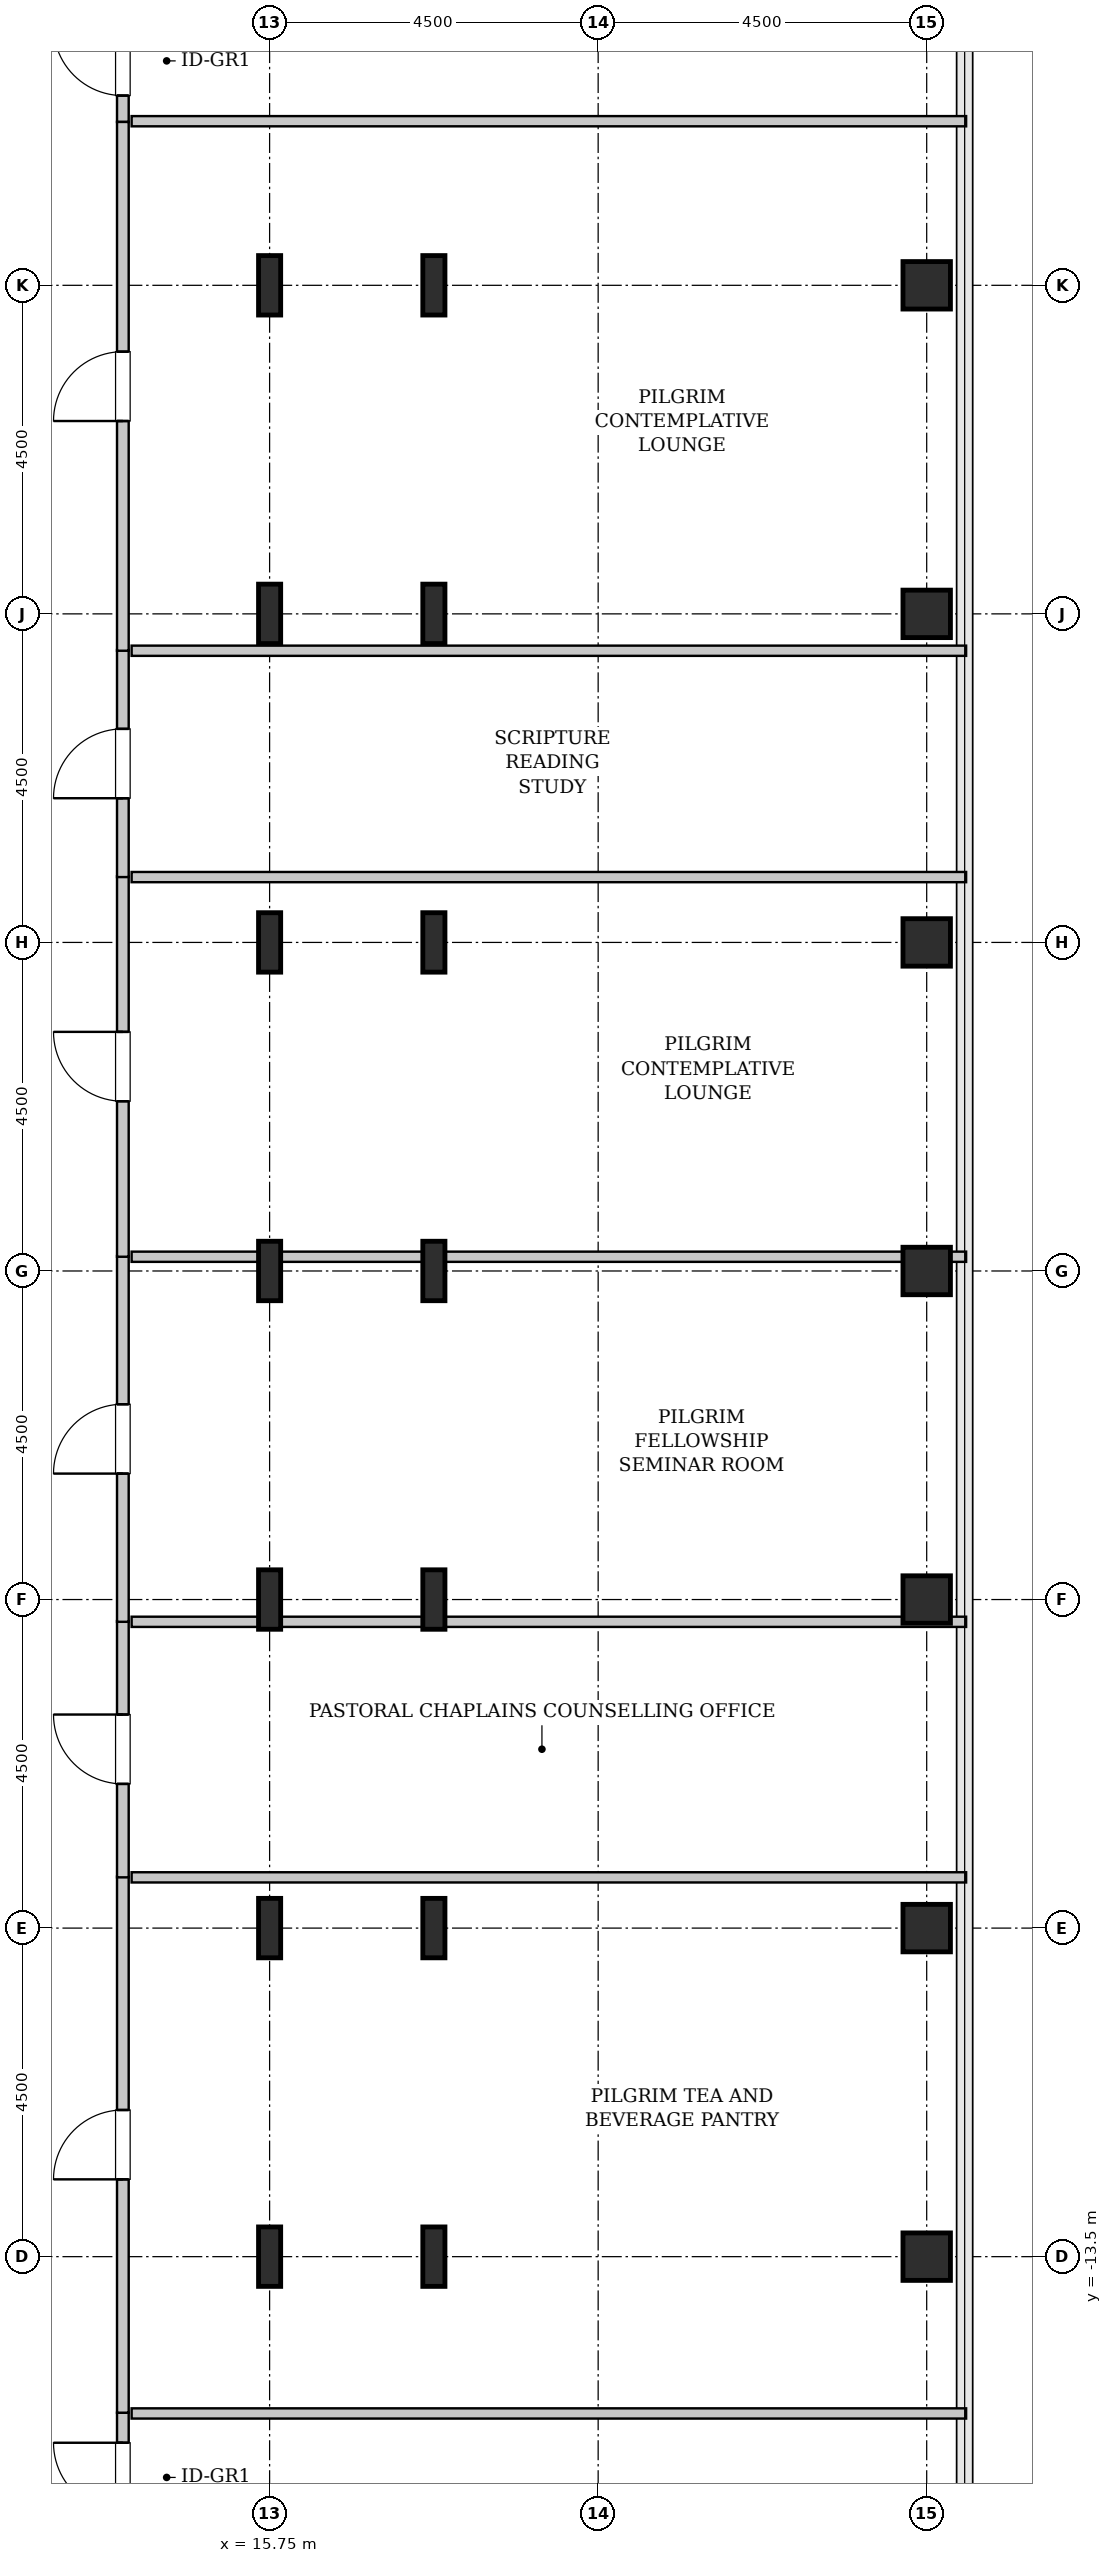
"""IFC4 building model, lengths in metres.
Left out: names, types, materials, properties, quantities, classifications, styles, units other than length and angle.
Written with IfcOpenShell. Run it as: python <this file> out.ifc"""

import sys

from ifc_helpers import new_model, si_unit, direction, frame, frame_2d, origin, origin_2d, place, context, subcontext, project, spatial, rectangle, hollow_rectangle, i_section, extrude, source, transform, mapped, element, fill, save


model = new_model("IFC4")
c1 = context("Model", 3, precision=1e-05, world=origin(), true_north=direction((0.0, 1.0)))
c2 = subcontext(c1, "Body", "Model", "MODEL_VIEW")
j1 = project(units=[si_unit("LENGTHUNIT", "METRE"), si_unit("PLANEANGLEUNIT", "RADIAN")], contexts=[c1])
p1 = place(None, origin())
s1 = spatial("IfcSite", under=j1, at=p1, CompositionType="ELEMENT")
p2 = place(p1, origin())
s2 = spatial("IfcBuilding", under=s1, at=p2, CompositionType="ELEMENT")
p3 = place(p2, frame((0.0, 0.0, 244.6)))
s3 = spatial("IfcBuildingStorey", under=s2, at=p3, CompositionType="ELEMENT", Elevation=244.6)
m1 = source(origin(), c2, "Body", "SweptSolid", [
    extrude(i_section(OverallWidth=0.303, OverallDepth=0.814, WebThickness=0.021, FlangeThickness=0.04, FilletRadius=0.03, at=origin_2d()), origin(), (0.0, 0.0, 1.0), 3.8),
])
for number, where, z_axis, x_axis in (
    (1, (15.75, -13.5, 0.0), (0.0, 0.0, 1.0), (1.0, 0.0, 0.0)),
    (2, (15.75, -9.0, 0.0), (0.0, 0.0, 1.0), (1.0, 0.0, 0.0)),
    (3, (15.75, -4.5, 0.0), (0.0, 0.0, 1.0), (1.0, 0.0, 0.0)),
    (4, (15.75, 0.0, 0.0), (0.0, 0.0, 1.0), (1.0, 0.0, 0.0)),
    (5, (15.75, 4.5, 0.0), (0.0, 0.0, 1.0), (1.0, 0.0, 0.0)),
    (6, (15.75, 9.0, 0.0), (0.0, 0.0, 1.0), (1.0, 0.0, 0.0)),
    (7, (15.75, 13.5, 0.0), (0.0, 0.0, 1.0), (1.0, 0.0, 0.0)),
    (8, (18.0, -13.5, 0.0), (0.0, 0.0, 1.0), (1.0, 0.0, 0.0)),
    (9, (18.0, -9.0, 0.0), (0.0, 0.0, 1.0), (1.0, 0.0, 0.0)),
    (10, (18.0, -4.5, 0.0), (0.0, 0.0, 1.0), (1.0, 0.0, 0.0)),
    (11, (18.0, 0.0, 0.0), (0.0, 0.0, 1.0), (1.0, 0.0, 0.0)),
    (12, (18.0, 4.5, 0.0), (0.0, 0.0, 1.0), (1.0, 0.0, 0.0)),
    (13, (18.0, 9.0, 0.0), (0.0, 0.0, 1.0), (1.0, 0.0, 0.0)),
    (14, (18.0, 13.5, 0.0), (0.0, 0.0, 1.0), (1.0, 0.0, 0.0)),
):
    element("IfcColumn", number, at=place(p3, frame(where, z_axis=z_axis, x_axis=x_axis)), inside=s3, PredefinedType="COLUMN", context=c2, shape_type="MappedRepresentation", body=[
        mapped(m1, transform((0.0, 0.0, 0.0), x_axis=(1.0, 0.0, 0.0), y_axis=(0.0, 1.0, 0.0), z_axis=(0.0, 0.0, 1.0), scale=1.0)),
    ])
m2 = source(origin(), c2, "Body", "SweptSolid", [
    extrude(hollow_rectangle(XDim=0.65, YDim=0.65, WallThickness=0.032, InnerFilletRadius=0.032, OuterFilletRadius=0.064, at=origin_2d()), origin(), (0.0, 0.0, 1.0), 3.8),
])
for number, where, z_axis, x_axis in (
    (15, (24.75, -13.5, 0.0), (0.0, 0.0, 1.0), (1.0, 0.0, 0.0)),
    (16, (24.75, -9.0, 0.0), (0.0, 0.0, 1.0), (1.0, 0.0, 0.0)),
    (17, (24.75, -4.5, 0.0), (0.0, 0.0, 1.0), (1.0, 0.0, 0.0)),
    (18, (24.75, 0.0, 0.0), (0.0, 0.0, 1.0), (1.0, 0.0, 0.0)),
    (19, (24.75, 4.5, 0.0), (0.0, 0.0, 1.0), (1.0, 0.0, 0.0)),
    (20, (24.75, 9.0, 0.0), (0.0, 0.0, 1.0), (1.0, 0.0, 0.0)),
    (21, (24.75, 13.5, 0.0), (0.0, 0.0, 1.0), (1.0, 0.0, 0.0)),
):
    element("IfcColumn", number, at=place(p3, frame(where, z_axis=z_axis, x_axis=x_axis)), inside=s3, PredefinedType="COLUMN", context=c2, shape_type="MappedRepresentation", body=[
        mapped(m2, transform((0.0, 0.0, 0.0), x_axis=(1.0, 0.0, 0.0), y_axis=(0.0, 1.0, 0.0), z_axis=(0.0, 0.0, 1.0), scale=1.0)),
    ])
m3 = source(origin(), c2, "Body", "SweptSolid", [
    extrude(rectangle(XDim=7.403, YDim=0.16, at=frame_2d((3.701, 0.0))), origin(), (0.0, 0.0, 1.0), 3.535),
])
p4 = place(p3, frame((13.74, -23.04, 0.0), z_axis=(0.0, 0.0, 1.0), x_axis=(0.0, 1.0, 0.0)))
e22 = element("IfcWall", 22, at=p4, inside=s3, PredefinedType="PARTITIONING", context=c2, shape_type="MappedRepresentation", body=[
    mapped(m3, transform((0.0, 0.0, 0.0), x_axis=(1.0, 0.0, 0.0), y_axis=(0.0, 1.0, 0.0), z_axis=(0.0, 0.0, 1.0), scale=1.0)),
])
p5 = place(p4, frame((6.041, 0.0, 0.0)))
e23 = element("IfcOpeningElement", 23, at=p5, cuts=e22, PredefinedType="OPENING", context=c2, shape_type="SweptSolid", body=[
    extrude(rectangle(XDim=0.95, YDim=2.1, at=frame_2d((0.475, 1.05))), frame((0.0, 0.09, 0.0), z_axis=(0.0, -1.0, 0.0), x_axis=(1.0, 0.0, 0.0)), (0.0, 0.0, 1.0), 0.18),
])
m4 = source(origin(), c2, "Body", "SweptSolid", [
    extrude(rectangle(XDim=11.43, YDim=0.14, at=frame_2d((5.715, 0.0))), origin(), (0.0, 0.0, 1.0), 3.535),
])
p6 = place(p3, frame((13.86, -15.647, 0.0), z_axis=(0.0, 0.0, 1.0), x_axis=(1.0, 0.0, 0.0)))
e24 = element("IfcWall", 24, at=p6, inside=s3, PredefinedType="PARTITIONING", context=c2, shape_type="MappedRepresentation", body=[
    mapped(m4, transform((0.0, 0.0, 0.0), x_axis=(1.0, 0.0, 0.0), y_axis=(0.0, 1.0, 0.0), z_axis=(0.0, 0.0, 1.0), scale=1.0)),
])
m5 = source(origin(), c2, "Body", "SweptSolid", [
    extrude(rectangle(XDim=7.343, YDim=0.16, at=frame_2d((3.671, 0.0))), origin(), (0.0, 0.0, 1.0), 3.535),
])
p7 = place(p3, frame((13.74, -15.637, 0.0), z_axis=(0.0, 0.0, 1.0), x_axis=(0.0, 1.0, 0.0)))
e25 = element("IfcWall", 25, at=p7, inside=s3, PredefinedType="PARTITIONING", context=c2, shape_type="MappedRepresentation", body=[
    mapped(m5, transform((0.0, 0.0, 0.0), x_axis=(1.0, 0.0, 0.0), y_axis=(0.0, 1.0, 0.0), z_axis=(0.0, 0.0, 1.0), scale=1.0)),
])
p8 = place(p7, frame((3.196, 0.0, 0.0)))
e26 = element("IfcOpeningElement", 26, at=p8, cuts=e25, PredefinedType="OPENING", context=c2, shape_type="SweptSolid", body=[
    extrude(rectangle(XDim=0.95, YDim=2.1, at=frame_2d((0.475, 1.05))), frame((0.0, 0.09, 0.0), z_axis=(0.0, -1.0, 0.0), x_axis=(1.0, 0.0, 0.0)), (0.0, 0.0, 1.0), 0.18),
])
p9 = place(p3, frame((13.86, -8.305, 0.0), z_axis=(0.0, 0.0, 1.0), x_axis=(1.0, 0.0, 0.0)))
e27 = element("IfcWall", 27, at=p9, inside=s3, PredefinedType="PARTITIONING", context=c2, shape_type="MappedRepresentation", body=[
    mapped(m4, transform((0.0, 0.0, 0.0), x_axis=(1.0, 0.0, 0.0), y_axis=(0.0, 1.0, 0.0), z_axis=(0.0, 0.0, 1.0), scale=1.0)),
])
m6 = source(origin(), c2, "Body", "SweptSolid", [
    extrude(rectangle(XDim=3.51, YDim=0.16, at=frame_2d((1.755, 0.0))), origin(), (0.0, 0.0, 1.0), 3.535),
])
p10 = place(p3, frame((13.74, -8.305, 0.0), z_axis=(0.0, 0.0, 1.0), x_axis=(0.0, 1.0, 0.0)))
e28 = element("IfcWall", 28, at=p10, inside=s3, PredefinedType="PARTITIONING", context=c2, shape_type="MappedRepresentation", body=[
    mapped(m6, transform((0.0, 0.0, 0.0), x_axis=(1.0, 0.0, 0.0), y_axis=(0.0, 1.0, 0.0), z_axis=(0.0, 0.0, 1.0), scale=1.0)),
])
p11 = place(p10, frame((1.28, 0.0, 0.0)))
e29 = element("IfcOpeningElement", 29, at=p11, cuts=e28, PredefinedType="OPENING", context=c2, shape_type="SweptSolid", body=[
    extrude(rectangle(XDim=0.95, YDim=2.1, at=frame_2d((0.475, 1.05))), frame((0.0, 0.09, 0.0), z_axis=(0.0, -1.0, 0.0), x_axis=(1.0, 0.0, 0.0)), (0.0, 0.0, 1.0), 0.18),
])
m7 = source(origin(), c2, "Body", "SweptSolid", [
    extrude(rectangle(XDim=11.43, YDim=0.14, at=frame_2d((5.715, 0.0))), origin(), (0.0, 0.0, 1.0), 2.925),
])
p12 = place(p3, frame((13.86, -4.805, 0.0), z_axis=(0.0, 0.0, 1.0), x_axis=(1.0, 0.0, 0.0)))
e30 = element("IfcWall", 30, at=p12, inside=s3, PredefinedType="PARTITIONING", context=c2, shape_type="MappedRepresentation", body=[
    mapped(m7, transform((0.0, 0.0, 0.0), x_axis=(1.0, 0.0, 0.0), y_axis=(0.0, 1.0, 0.0), z_axis=(0.0, 0.0, 1.0), scale=1.0)),
])
m8 = source(origin(), c2, "Body", "SweptSolid", [
    extrude(rectangle(XDim=5.01, YDim=0.16, at=frame_2d((2.505, 0.0))), origin(), (0.0, 0.0, 1.0), 3.535),
])
p13 = place(p3, frame((13.74, -4.805, 0.0), z_axis=(0.0, 0.0, 1.0), x_axis=(0.0, 1.0, 0.0)))
e31 = element("IfcWall", 31, at=p13, inside=s3, PredefinedType="PARTITIONING", context=c2, shape_type="MappedRepresentation", body=[
    mapped(m8, transform((0.0, 0.0, 0.0), x_axis=(1.0, 0.0, 0.0), y_axis=(0.0, 1.0, 0.0), z_axis=(0.0, 0.0, 1.0), scale=1.0)),
])
p14 = place(p13, frame((2.03, 0.0, 0.0)))
e32 = element("IfcOpeningElement", 32, at=p14, cuts=e31, PredefinedType="OPENING", context=c2, shape_type="SweptSolid", body=[
    extrude(rectangle(XDim=0.95, YDim=2.1, at=frame_2d((0.475, 1.05))), frame((0.0, 0.09, 0.0), z_axis=(0.0, -1.0, 0.0), x_axis=(1.0, 0.0, 0.0)), (0.0, 0.0, 1.0), 0.18),
])
p15 = place(p3, frame((13.86, 0.195, 0.0), z_axis=(0.0, 0.0, 1.0), x_axis=(1.0, 0.0, 0.0)))
e33 = element("IfcWall", 33, at=p15, inside=s3, PredefinedType="PARTITIONING", context=c2, shape_type="MappedRepresentation", body=[
    mapped(m7, transform((0.0, 0.0, 0.0), x_axis=(1.0, 0.0, 0.0), y_axis=(0.0, 1.0, 0.0), z_axis=(0.0, 0.0, 1.0), scale=1.0)),
])
m9 = source(origin(), c2, "Body", "SweptSolid", [
    extrude(rectangle(XDim=5.21, YDim=0.16, at=frame_2d((2.605, 0.0))), origin(), (0.0, 0.0, 1.0), 3.535),
])
p16 = place(p3, frame((13.74, 0.195, 0.0), z_axis=(0.0, 0.0, 1.0), x_axis=(0.0, 1.0, 0.0)))
e34 = element("IfcWall", 34, at=p16, inside=s3, PredefinedType="PARTITIONING", context=c2, shape_type="MappedRepresentation", body=[
    mapped(m9, transform((0.0, 0.0, 0.0), x_axis=(1.0, 0.0, 0.0), y_axis=(0.0, 1.0, 0.0), z_axis=(0.0, 0.0, 1.0), scale=1.0)),
])
p17 = place(p16, frame((2.13, 0.0, 0.0)))
e35 = element("IfcOpeningElement", 35, at=p17, cuts=e34, PredefinedType="OPENING", context=c2, shape_type="SweptSolid", body=[
    extrude(rectangle(XDim=0.95, YDim=2.1, at=frame_2d((0.475, 1.05))), frame((0.0, 0.09, 0.0), z_axis=(0.0, -1.0, 0.0), x_axis=(1.0, 0.0, 0.0)), (0.0, 0.0, 1.0), 0.18),
])
p18 = place(p3, frame((13.86, 5.395, 0.0), z_axis=(0.0, 0.0, 1.0), x_axis=(1.0, 0.0, 0.0)))
e36 = element("IfcWall", 36, at=p18, inside=s3, PredefinedType="PARTITIONING", context=c2, shape_type="MappedRepresentation", body=[
    mapped(m4, transform((0.0, 0.0, 0.0), x_axis=(1.0, 0.0, 0.0), y_axis=(0.0, 1.0, 0.0), z_axis=(0.0, 0.0, 1.0), scale=1.0)),
])
m10 = source(origin(), c2, "Body", "SweptSolid", [
    extrude(rectangle(XDim=3.11, YDim=0.16, at=frame_2d((1.555, 0.0))), origin(), (0.0, 0.0, 1.0), 3.535),
])
p19 = place(p3, frame((13.74, 5.395, 0.0), z_axis=(0.0, 0.0, 1.0), x_axis=(0.0, 1.0, 0.0)))
e37 = element("IfcWall", 37, at=p19, inside=s3, PredefinedType="PARTITIONING", context=c2, shape_type="MappedRepresentation", body=[
    mapped(m10, transform((0.0, 0.0, 0.0), x_axis=(1.0, 0.0, 0.0), y_axis=(0.0, 1.0, 0.0), z_axis=(0.0, 0.0, 1.0), scale=1.0)),
])
p20 = place(p19, frame((1.08, 0.0, 0.0)))
e38 = element("IfcOpeningElement", 38, at=p20, cuts=e37, PredefinedType="OPENING", context=c2, shape_type="SweptSolid", body=[
    extrude(rectangle(XDim=0.95, YDim=2.1, at=frame_2d((0.475, 1.05))), frame((0.0, 0.09, 0.0), z_axis=(0.0, -1.0, 0.0), x_axis=(1.0, 0.0, 0.0)), (0.0, 0.0, 1.0), 0.18),
])
p21 = place(p3, frame((13.86, 8.495, 0.0), z_axis=(0.0, 0.0, 1.0), x_axis=(1.0, 0.0, 0.0)))
e39 = element("IfcWall", 39, at=p21, inside=s3, PredefinedType="PARTITIONING", context=c2, shape_type="MappedRepresentation", body=[
    mapped(m7, transform((0.0, 0.0, 0.0), x_axis=(1.0, 0.0, 0.0), y_axis=(0.0, 1.0, 0.0), z_axis=(0.0, 0.0, 1.0), scale=1.0)),
])
m11 = source(origin(), c2, "Body", "SweptSolid", [
    extrude(rectangle(XDim=7.302, YDim=0.16, at=frame_2d((3.651, 0.0))), origin(), (0.0, 0.0, 1.0), 3.535),
])
p22 = place(p3, frame((13.74, 15.738, 0.0), z_axis=(0.0, 0.0, 1.0), x_axis=(0.0, 1.0, 0.0)))
e40 = element("IfcWall", 40, at=p22, inside=s3, PredefinedType="PARTITIONING", context=c2, shape_type="MappedRepresentation", body=[
    mapped(m11, transform((0.0, 0.0, 0.0), x_axis=(1.0, 0.0, 0.0), y_axis=(0.0, 1.0, 0.0), z_axis=(0.0, 0.0, 1.0), scale=1.0)),
])
p23 = place(p22, frame((0.361, 0.0, 0.0)))
e41 = element("IfcOpeningElement", 41, at=p23, cuts=e40, PredefinedType="OPENING", context=c2, shape_type="SweptSolid", body=[
    extrude(rectangle(XDim=0.95, YDim=2.1, at=frame_2d((0.475, 1.05))), frame((0.0, 0.09, 0.0), z_axis=(0.0, -1.0, 0.0), x_axis=(1.0, 0.0, 0.0)), (0.0, 0.0, 1.0), 0.18),
])
p24 = place(p3, frame((13.86, 15.748, 0.0), z_axis=(0.0, 0.0, 1.0), x_axis=(1.0, 0.0, 0.0)))
e42 = element("IfcWall", 42, at=p24, inside=s3, PredefinedType="PARTITIONING", context=c2, shape_type="MappedRepresentation", body=[
    mapped(m4, transform((0.0, 0.0, 0.0), x_axis=(1.0, 0.0, 0.0), y_axis=(0.0, 1.0, 0.0), z_axis=(0.0, 0.0, 1.0), scale=1.0)),
])
m12 = source(origin(), c2, "Body", "SweptSolid", [
    extrude(rectangle(XDim=7.242, YDim=0.16, at=frame_2d((3.621, 0.0))), origin(), (0.0, 0.0, 1.0), 3.535),
])
p25 = place(p3, frame((13.74, 8.495, 0.0), z_axis=(0.0, 0.0, 1.0), x_axis=(0.0, 1.0, 0.0)))
e43 = element("IfcWall", 43, at=p25, inside=s3, PredefinedType="PARTITIONING", context=c2, shape_type="MappedRepresentation", body=[
    mapped(m12, transform((0.0, 0.0, 0.0), x_axis=(1.0, 0.0, 0.0), y_axis=(0.0, 1.0, 0.0), z_axis=(0.0, 0.0, 1.0), scale=1.0)),
])
p26 = place(p25, frame((3.146, 0.0, 0.0)))
e44 = element("IfcOpeningElement", 44, at=p26, cuts=e43, PredefinedType="OPENING", context=c2, shape_type="SweptSolid", body=[
    extrude(rectangle(XDim=0.95, YDim=2.1, at=frame_2d((0.475, 1.05))), frame((0.0, 0.09, 0.0), z_axis=(0.0, -1.0, 0.0), x_axis=(1.0, 0.0, 0.0)), (0.0, 0.0, 1.0), 0.18),
])
m13 = source(origin(), c2, "Body", "SweptSolid", [
    extrude(rectangle(XDim=0.95, YDim=2.1, at=frame_2d((0.475, 1.05))), frame((0.0, 0.025, 0.0), z_axis=(0.0, -1.0, 0.0), x_axis=(1.0, 0.0, 0.0)), (0.0, 0.0, 1.0), 0.05),
])
p27 = place(p5, origin())
e45 = element("IfcDoor", 45, at=p27, inside=s3, OperationType="SINGLE_SWING_RIGHT", PredefinedType="DOOR", context=c2, shape_type="MappedRepresentation", body=[
    mapped(m13, transform((0.0, 0.0, 0.0), x_axis=(1.0, 0.0, 0.0), y_axis=(0.0, 1.0, 0.0), z_axis=(0.0, 0.0, 1.0), scale=1.0)),
])
fill(e23, e45)
p28 = place(p8, origin())
e46 = element("IfcDoor", 46, at=p28, inside=s3, OperationType="SINGLE_SWING_LEFT", PredefinedType="DOOR", context=c2, shape_type="MappedRepresentation", body=[
    mapped(m13, transform((0.0, 0.0, 0.0), x_axis=(1.0, 0.0, 0.0), y_axis=(0.0, 1.0, 0.0), z_axis=(0.0, 0.0, 1.0), scale=1.0)),
])
fill(e26, e46)
p29 = place(p11, origin())
e47 = element("IfcDoor", 47, at=p29, inside=s3, OperationType="SINGLE_SWING_RIGHT", PredefinedType="DOOR", context=c2, shape_type="MappedRepresentation", body=[
    mapped(m13, transform((0.0, 0.0, 0.0), x_axis=(1.0, 0.0, 0.0), y_axis=(0.0, 1.0, 0.0), z_axis=(0.0, 0.0, 1.0), scale=1.0)),
])
fill(e29, e47)
p30 = place(p14, origin())
e48 = element("IfcDoor", 48, at=p30, inside=s3, OperationType="SINGLE_SWING_LEFT", PredefinedType="DOOR", context=c2, shape_type="MappedRepresentation", body=[
    mapped(m13, transform((0.0, 0.0, 0.0), x_axis=(1.0, 0.0, 0.0), y_axis=(0.0, 1.0, 0.0), z_axis=(0.0, 0.0, 1.0), scale=1.0)),
])
fill(e32, e48)
p31 = place(p17, origin())
e49 = element("IfcDoor", 49, at=p31, inside=s3, OperationType="SINGLE_SWING_RIGHT", PredefinedType="DOOR", context=c2, shape_type="MappedRepresentation", body=[
    mapped(m13, transform((0.0, 0.0, 0.0), x_axis=(1.0, 0.0, 0.0), y_axis=(0.0, 1.0, 0.0), z_axis=(0.0, 0.0, 1.0), scale=1.0)),
])
fill(e35, e49)
p32 = place(p20, origin())
e50 = element("IfcDoor", 50, at=p32, inside=s3, OperationType="SINGLE_SWING_LEFT", PredefinedType="DOOR", context=c2, shape_type="MappedRepresentation", body=[
    mapped(m13, transform((0.0, 0.0, 0.0), x_axis=(1.0, 0.0, 0.0), y_axis=(0.0, 1.0, 0.0), z_axis=(0.0, 0.0, 1.0), scale=1.0)),
])
fill(e38, e50)
p33 = place(p23, origin())
e51 = element("IfcDoor", 51, at=p33, inside=s3, OperationType="SINGLE_SWING_RIGHT", PredefinedType="DOOR", context=c2, shape_type="MappedRepresentation", body=[
    mapped(m13, transform((0.0, 0.0, 0.0), x_axis=(1.0, 0.0, 0.0), y_axis=(0.0, 1.0, 0.0), z_axis=(0.0, 0.0, 1.0), scale=1.0)),
])
fill(e41, e51)
p34 = place(p26, origin())
e52 = element("IfcDoor", 52, at=p34, inside=s3, OperationType="SINGLE_SWING_LEFT", PredefinedType="DOOR", context=c2, shape_type="MappedRepresentation", body=[
    mapped(m13, transform((0.0, 0.0, 0.0), x_axis=(1.0, 0.0, 0.0), y_axis=(0.0, 1.0, 0.0), z_axis=(0.0, 0.0, 1.0), scale=1.0)),
])
fill(e44, e52)
save(model, sys.argv[1])
